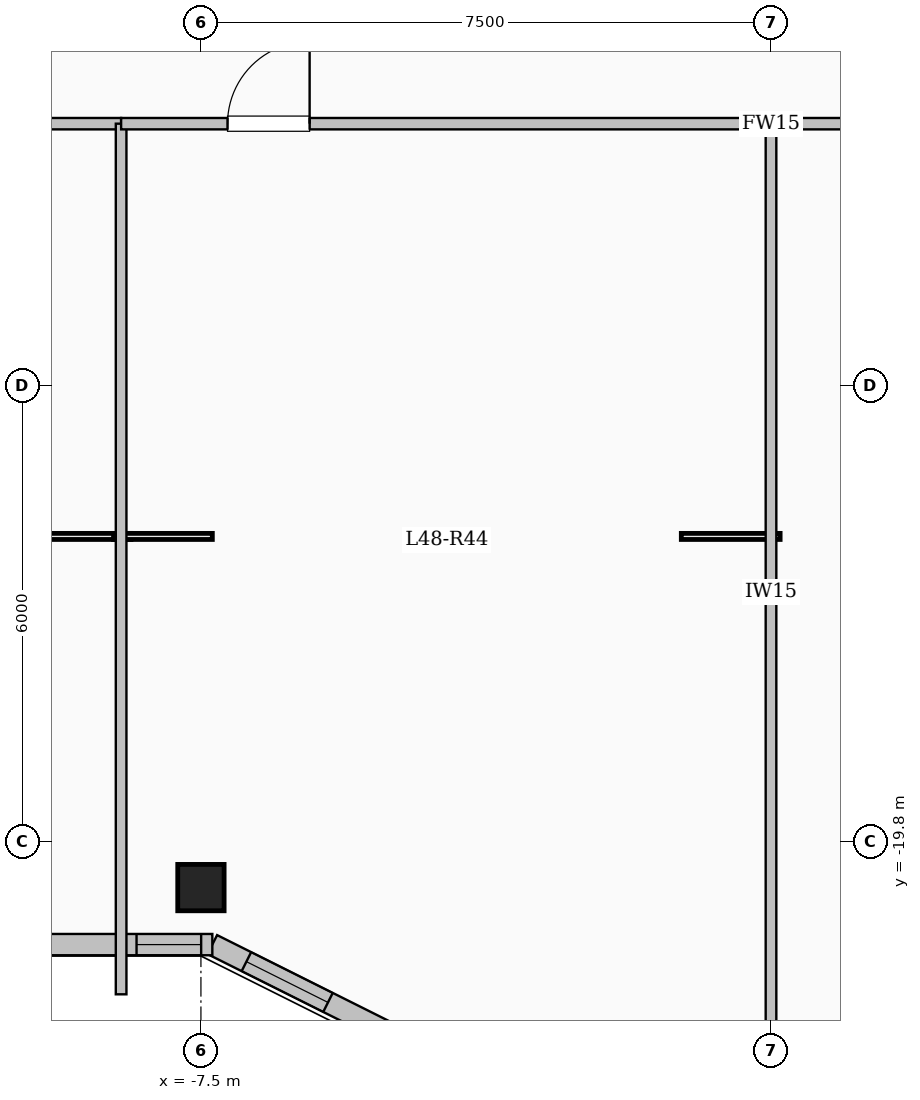
"""IFC4 building model, lengths in metres.
Left out: names, types, materials, properties, quantities, classifications, styles, units other than length and angle.
Written with IfcOpenShell. Run it as: python <this file> out.ifc"""

import sys

from ifc_helpers import new_model, si_unit, direction, frame, frame_2d, origin, origin_2d, place, context, subcontext, project, spatial, rectangle, hollow_circle, extrude, element, fill, save


model = new_model("IFC4")
c1 = context("Model", 3, precision=1e-05, world=origin(), true_north=direction((0.0, 1.0)))
c2 = subcontext(c1, "Body", "Model", "MODEL_VIEW")
j1 = project(units=[si_unit("LENGTHUNIT", "METRE"), si_unit("PLANEANGLEUNIT", "RADIAN")], contexts=[c1])
p1 = place(None, origin())
s1 = spatial("IfcSite", under=j1, at=p1, CompositionType="ELEMENT")
p2 = place(p1, origin())
s2 = spatial("IfcBuilding", under=s1, at=p2, CompositionType="ELEMENT")
p3 = place(p2, frame((0.0, 0.0, 177.3)))
s3 = spatial("IfcBuildingStorey", under=s2, at=p3, CompositionType="ELEMENT", Elevation=177.3)
p4 = place(p3, frame((-7.5, -20.4, 0.0), z_axis=(0.0, 0.0, 1.0), x_axis=(1.0, 0.0, 0.0)))
e1 = element("IfcColumn", 1, at=p4, inside=s3, PredefinedType="COLUMN", context=c2, shape_type="SweptSolid", body=[
    extrude(hollow_circle(Radius=0.305, WallThickness=0.025, at=origin_2d()), origin(), (0.0, 0.0, 1.0), 4.5),
])
p5 = place(p3, frame((-4.35, -22.65, 0.0), z_axis=(0.0, 0.0, 1.0), x_axis=(-0.894427191, 0.4472135955, 0.0)))
e2 = element("IfcWall", 2, at=p5, inside=s3, PredefinedType="SOLIDWALL", context=c2, shape_type="SweptSolid", body=[
    extrude(rectangle(XDim=3.354, YDim=0.28, at=frame_2d((1.677, 0.0))), origin(), (0.0, 0.0, 1.0), 4.2),
])
p6 = place(p5, frame((1.653, 0.0, 0.95)))
e3 = element("IfcOpeningElement", 3, at=p6, cuts=e2, PredefinedType="OPENING", context=c2, shape_type="SweptSolid", body=[
    extrude(rectangle(XDim=1.2, YDim=1.5, at=frame_2d((0.6, 0.75))), frame((0.0, 0.15, 0.0), z_axis=(0.0, -1.0, 0.0), x_axis=(1.0, 0.0, 0.0)), (0.0, 0.0, 1.0), 0.3),
])
p7 = place(p3, frame((-7.35, -21.15, 0.0), z_axis=(0.0, 0.0, 1.0), x_axis=(-1.0, 0.0, 0.0)))
e4 = element("IfcWall", 4, at=p7, inside=s3, PredefinedType="SOLIDWALL", context=c2, shape_type="SweptSolid", body=[
    extrude(rectangle(XDim=12.3, YDim=0.28, at=frame_2d((6.15, 0.0))), origin(), (0.0, 0.0, 1.0), 4.2),
])
p8 = place(p7, frame((0.147, 0.0, 0.95)))
e5 = element("IfcOpeningElement", 5, at=p8, cuts=e4, PredefinedType="OPENING", context=c2, shape_type="SweptSolid", body=[
    extrude(rectangle(XDim=0.85, YDim=1.5, at=frame_2d((0.425, 0.75))), frame((0.0, 0.15, 0.0), z_axis=(0.0, -1.0, 0.0), x_axis=(1.0, 0.0, 0.0)), (0.0, 0.0, 1.0), 0.3),
])
p9 = place(p7, frame((2.767, 0.0, 0.85)))
e6 = element("IfcOpeningElement", 6, at=p9, cuts=e4, PredefinedType="OPENING", context=c2, shape_type="SweptSolid", body=[
    extrude(rectangle(XDim=2.6, YDim=2.4, at=frame_2d((1.3, 1.2))), frame((0.0, 0.15, 0.0), z_axis=(0.0, -1.0, 0.0), x_axis=(1.0, 0.0, 0.0)), (0.0, 0.0, 1.0), 0.3),
])
p10 = place(p7, frame((8.314, 0.0, 0.85)))
e7 = element("IfcOpeningElement", 7, at=p10, cuts=e4, PredefinedType="OPENING", context=c2, shape_type="SweptSolid", body=[
    extrude(rectangle(XDim=2.6, YDim=2.4, at=frame_2d((1.3, 1.2))), frame((0.0, 0.15, 0.0), z_axis=(0.0, -1.0, 0.0), x_axis=(1.0, 0.0, 0.0)), (0.0, 0.0, 1.0), 0.3),
])
p11 = place(p3, frame((-19.55, -10.35, 0.0), z_axis=(0.0, 0.0, 1.0), x_axis=(1.0, 0.0, 0.0)))
e8 = element("IfcWall", 8, at=p11, inside=s3, PredefinedType="PARTITIONING", context=c2, shape_type="SweptSolid", body=[
    extrude(rectangle(XDim=11.0, YDim=0.15, at=frame_2d((5.5, 0.0))), origin(), (0.0, 0.0, 1.0), 4.2),
])
p12 = place(p11, frame((1.1, 0.0, 0.0)))
e9 = element("IfcOpeningElement", 9, at=p12, cuts=e8, PredefinedType="OPENING", context=c2, shape_type="SweptSolid", body=[
    extrude(rectangle(XDim=1.08, YDim=2.15, at=frame_2d((0.54, 1.075))), frame((0.0, 0.085, 0.0), z_axis=(0.0, -1.0, 0.0), x_axis=(1.0, 0.0, 0.0)), (0.0, 0.0, 1.0), 0.17),
])
p13 = place(p11, frame((6.156, 0.0, 0.0)))
e10 = element("IfcOpeningElement", 10, at=p13, cuts=e8, PredefinedType="OPENING", context=c2, shape_type="SweptSolid", body=[
    extrude(rectangle(XDim=1.08, YDim=2.15, at=frame_2d((0.54, 1.075))), frame((0.0, 0.085, 0.0), z_axis=(0.0, -1.0, 0.0), x_axis=(1.0, 0.0, 0.0)), (0.0, 0.0, 1.0), 0.17),
])
p14 = place(p3, frame((-8.55, -21.804, 0.0), z_axis=(0.0, 0.0, 1.0), x_axis=(0.0, 1.0, 0.0)))
e11 = element("IfcWall", 11, at=p14, inside=s3, PredefinedType="PARTITIONING", context=c2, shape_type="SweptSolid", body=[
    extrude(rectangle(XDim=11.454, YDim=0.14, at=frame_2d((5.727, 0.0))), origin(), (0.0, 0.0, 1.0), 4.2),
])
p15 = place(p3, frame((-8.55, -10.35, 0.0), z_axis=(0.0, 0.0, 1.0), x_axis=(1.0, 0.0, 0.0)))
e12 = element("IfcWall", 12, at=p15, inside=s3, PredefinedType="PARTITIONING", context=c2, shape_type="SweptSolid", body=[
    extrude(rectangle(XDim=17.1, YDim=0.15, at=frame_2d((8.55, 0.0))), origin(), (0.0, 0.0, 1.0), 4.2),
])
p16 = place(p15, frame((1.4, 0.0, 0.0)))
e13 = element("IfcOpeningElement", 13, at=p16, cuts=e12, PredefinedType="OPENING", context=c2, shape_type="SweptSolid", body=[
    extrude(rectangle(XDim=1.08, YDim=2.15, at=frame_2d((0.54, 1.075))), frame((0.0, 0.085, 0.0), z_axis=(0.0, -1.0, 0.0), x_axis=(1.0, 0.0, 0.0)), (0.0, 0.0, 1.0), 0.17),
])
p17 = place(p15, frame((10.5, 0.0, 0.0)))
e14 = element("IfcOpeningElement", 14, at=p17, cuts=e12, PredefinedType="OPENING", context=c2, shape_type="SweptSolid", body=[
    extrude(rectangle(XDim=1.08, YDim=2.15, at=frame_2d((0.54, 1.075))), frame((0.0, 0.085, 0.0), z_axis=(0.0, -1.0, 0.0), x_axis=(1.0, 0.0, 0.0)), (0.0, 0.0, 1.0), 0.17),
])
p18 = place(p3, frame((0.0, -22.68, 0.0), z_axis=(0.0, 0.0, 1.0), x_axis=(0.0, 1.0, 0.0)))
e15 = element("IfcWall", 15, at=p18, inside=s3, PredefinedType="PARTITIONING", context=c2, shape_type="SweptSolid", body=[
    extrude(rectangle(XDim=12.33, YDim=0.14, at=frame_2d((6.165, 0.0))), origin(), (0.0, 0.0, 1.0), 4.2),
])
p19 = place(p6, origin())
e16 = element("IfcWindow", 16, at=p19, inside=s3, PartitioningType="SINGLE_PANEL", PredefinedType="WINDOW", context=c2, shape_type="SweptSolid", body=[
    extrude(rectangle(XDim=1.2, YDim=1.5, at=frame_2d((0.6, 0.75))), frame((0.0, 0.03, 0.0), z_axis=(0.0, -1.0, 0.0), x_axis=(1.0, 0.0, 0.0)), (0.0, 0.0, 1.0), 0.06),
])
fill(e3, e16)
p20 = place(p8, origin())
e17 = element("IfcWindow", 17, at=p20, inside=s3, PartitioningType="SINGLE_PANEL", PredefinedType="WINDOW", context=c2, shape_type="SweptSolid", body=[
    extrude(rectangle(XDim=0.85, YDim=1.5, at=frame_2d((0.425, 0.75))), frame((0.0, 0.03, 0.0), z_axis=(0.0, -1.0, 0.0), x_axis=(1.0, 0.0, 0.0)), (0.0, 0.0, 1.0), 0.06),
])
fill(e5, e17)
p21 = place(p16, origin())
e18 = element("IfcDoor", 18, at=p21, inside=s3, OperationType="SINGLE_SWING_RIGHT", PredefinedType="DOOR", context=c2, shape_type="SweptSolid", body=[
    extrude(rectangle(XDim=1.08, YDim=2.15, at=frame_2d((0.54, 1.075))), frame((0.0, 0.025, 0.0), z_axis=(0.0, -1.0, 0.0), x_axis=(1.0, 0.0, 0.0)), (0.0, 0.0, 1.0), 0.05),
])
fill(e13, e18)
save(model, sys.argv[1])
